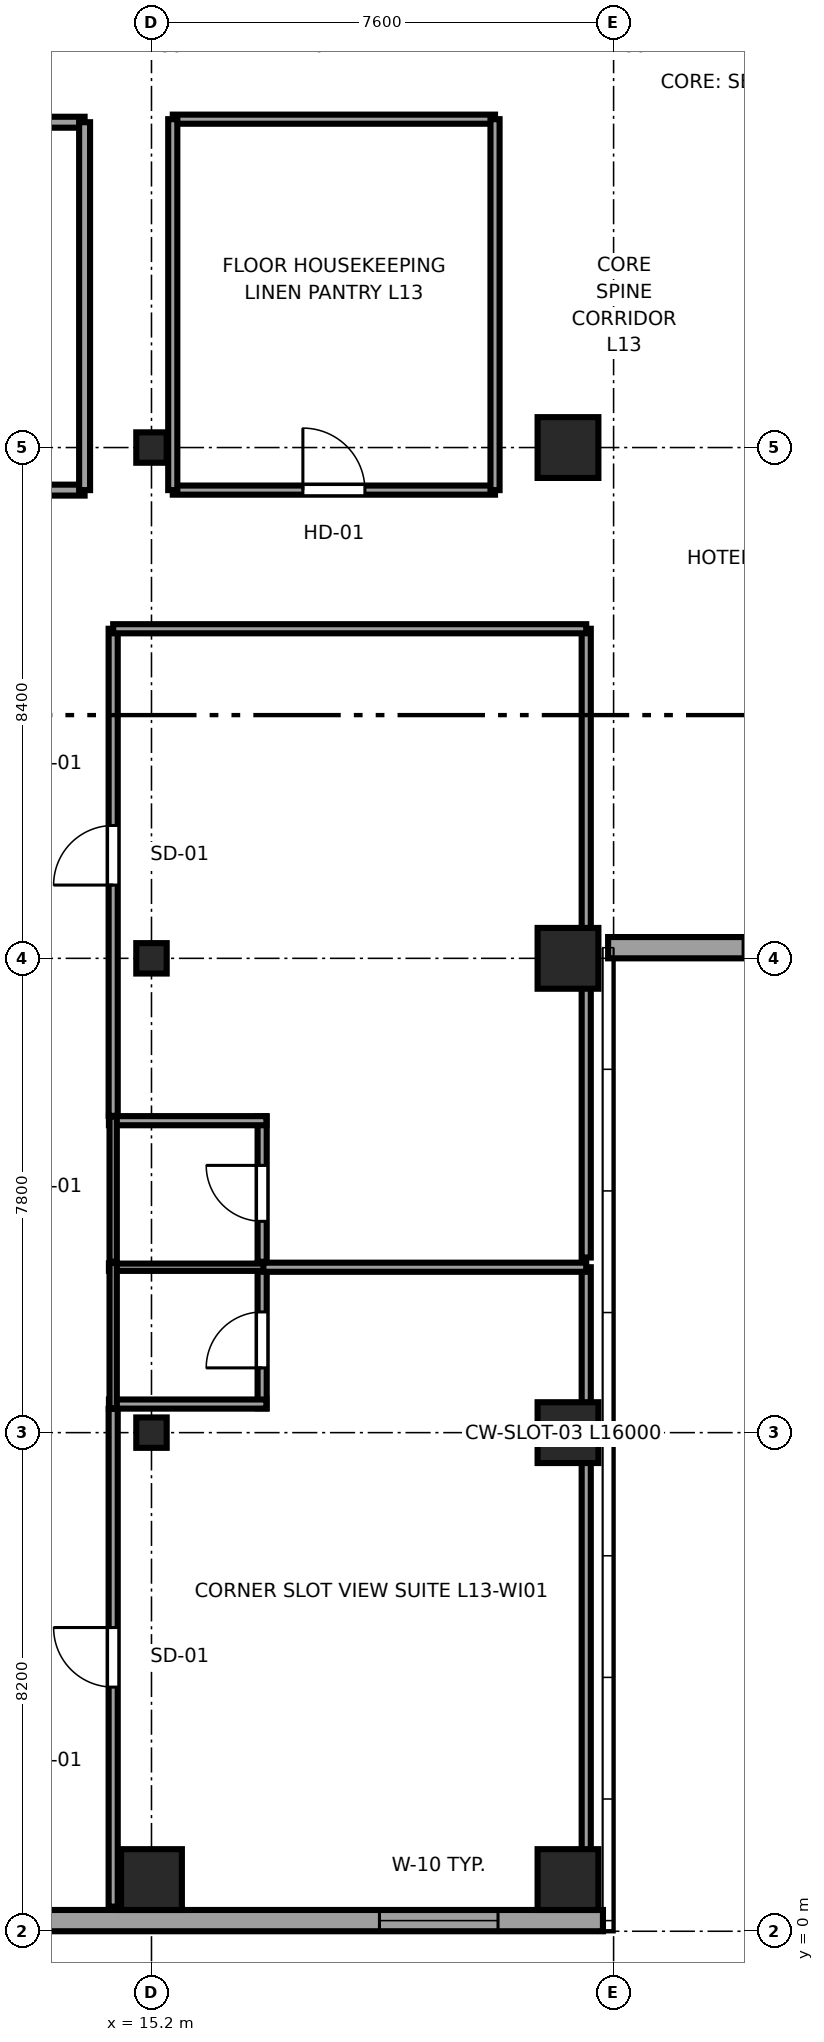
"""IFC4 building model, lengths in metres.
Left out: names, types, materials, properties, quantities, classifications, styles, units other than length and angle.
Written with IfcOpenShell. Run it as: python <this file> out.ifc"""

import sys

from ifc_helpers import new_model, si_unit, direction, frame, frame_2d, origin, origin_2d, place, context, subcontext, project, spatial, rectangle, i_section, extrude, source, transform, mapped, element, fill, save


model = new_model("IFC4")
c1 = context("Model", 3, precision=1e-05, world=origin(), true_north=direction((0.0, 1.0)))
c2 = subcontext(c1, "Body", "Model", "MODEL_VIEW")
j1 = project(units=[si_unit("LENGTHUNIT", "METRE"), si_unit("PLANEANGLEUNIT", "RADIAN")], contexts=[c1])
p1 = place(None, origin())
s1 = spatial("IfcSite", under=j1, at=p1, CompositionType="ELEMENT")
p2 = place(p1, origin())
s2 = spatial("IfcBuilding", under=s1, at=p2, CompositionType="ELEMENT")
p3 = place(p2, frame((0.0, 0.0, 56.85)))
s3 = spatial("IfcBuildingStorey", under=s2, at=p3, CompositionType="ELEMENT", Elevation=56.85)
m1 = source(origin(), c2, "Body", "SweptSolid", [
    extrude(rectangle(XDim=1.0, YDim=1.0, at=origin_2d()), origin(), (0.0, 0.0, 1.0), 3.55),
])
p4 = place(p3, frame((15.2, 0.85, 0.0), z_axis=(0.0, 0.0, 1.0), x_axis=(1.0, 0.0, 0.0)))
e1 = element("IfcColumn", 1, at=p4, inside=s3, PredefinedType="COLUMN", context=c2, shape_type="MappedRepresentation", body=[
    mapped(m1, transform((0.0, 0.0, 0.0), x_axis=(1.0, 0.0, 0.0), y_axis=(0.0, 1.0, 0.0), z_axis=(0.0, 0.0, 1.0), scale=1.0)),
])
m2 = source(origin(), c2, "Body", "SweptSolid", [
    extrude(i_section(OverallWidth=0.5, OverallDepth=0.5, WebThickness=0.028, FlangeThickness=0.045, at=origin_2d()), origin(), (0.0, 0.0, 1.0), 3.55),
])
for number, where, z_axis, x_axis in (
    (2, (15.2, 8.2, 0.0), (0.0, 0.0, 1.0), (1.0, 0.0, 0.0)),
    (3, (15.2, 16.0, 0.0), (0.0, 0.0, 1.0), (1.0, 0.0, 0.0)),
    (4, (15.2, 24.4, 0.0), (0.0, 0.0, 1.0), (1.0, 0.0, 0.0)),
):
    element("IfcColumn", number, at=place(p3, frame(where, z_axis=z_axis, x_axis=x_axis)), inside=s3, PredefinedType="COLUMN", context=c2, shape_type="MappedRepresentation", body=[
        mapped(m2, transform((0.0, 0.0, 0.0), x_axis=(1.0, 0.0, 0.0), y_axis=(0.0, 1.0, 0.0), z_axis=(0.0, 0.0, 1.0), scale=1.0)),
    ])
for number, where, z_axis, x_axis in (
    (5, (22.05, 0.85, 0.0), (0.0, 0.0, 1.0), (1.0, 0.0, 0.0)),
    (6, (22.05, 8.2, 0.0), (0.0, 0.0, 1.0), (1.0, 0.0, 0.0)),
    (7, (22.05, 16.0, 0.0), (0.0, 0.0, 1.0), (1.0, 0.0, 0.0)),
    (8, (22.05, 24.4, 0.0), (0.0, 0.0, 1.0), (1.0, 0.0, 0.0)),
):
    element("IfcColumn", number, at=place(p3, frame(where, z_axis=z_axis, x_axis=x_axis)), inside=s3, PredefinedType="COLUMN", context=c2, shape_type="MappedRepresentation", body=[
        mapped(m1, transform((0.0, 0.0, 0.0), x_axis=(1.0, 0.0, 0.0), y_axis=(0.0, 1.0, 0.0), z_axis=(0.0, 0.0, 1.0), scale=1.0)),
    ])
p5 = place(p3, frame((4.617, 0.175, 0.0), z_axis=(0.0, 0.0, 1.0), x_axis=(1.0, 0.0, 0.0)))
e9 = element("IfcWall", 9, at=p5, inside=s3, PredefinedType="SOLIDWALL", context=c2, shape_type="SweptSolid", body=[
    extrude(rectangle(XDim=18.008, YDim=0.35, at=frame_2d((9.004, 0.0))), origin(), (0.0, 0.0, 1.0), 3.37),
])
p6 = place(p5, frame((5.378, 0.0, 0.68)))
e10 = element("IfcOpeningElement", 10, at=p6, cuts=e9, PredefinedType="OPENING", context=c2, shape_type="SweptSolid", body=[
    extrude(rectangle(XDim=1.95, YDim=1.82, at=frame_2d((0.975, 0.91))), frame((0.0, 0.185, 0.0), z_axis=(0.0, -1.0, 0.0), x_axis=(1.0, 0.0, 0.0)), (0.0, 0.0, 1.0), 0.37),
])
p7 = place(p5, frame((14.332, 0.0, 0.68)))
e11 = element("IfcOpeningElement", 11, at=p7, cuts=e9, PredefinedType="OPENING", context=c2, shape_type="SweptSolid", body=[
    extrude(rectangle(XDim=1.95, YDim=1.82, at=frame_2d((0.975, 0.91))), frame((0.0, 0.185, 0.0), z_axis=(0.0, -1.0, 0.0), x_axis=(1.0, 0.0, 0.0)), (0.0, 0.0, 1.0), 0.37),
])
p8 = place(p3, frame((22.71, 16.175, 0.0), z_axis=(0.0, 0.0, 1.0), x_axis=(1.0, 0.0, 0.0)))
e12 = element("IfcWall", 12, at=p8, inside=s3, PredefinedType="SOLIDWALL", context=c2, shape_type="SweptSolid", body=[
    extrude(rectangle(XDim=11.58, YDim=0.35, at=frame_2d((5.79, 0.0))), origin(), (0.0, 0.0, 1.0), 2.748),
])
p9 = place(p8, frame((2.22, 0.0, 0.68)))
e13 = element("IfcOpeningElement", 13, at=p9, cuts=e12, PredefinedType="OPENING", context=c2, shape_type="SweptSolid", body=[
    extrude(rectangle(XDim=1.95, YDim=1.82, at=frame_2d((0.975, 0.91))), frame((0.0, 0.185, 0.0), z_axis=(0.0, -1.0, 0.0), x_axis=(1.0, 0.0, 0.0)), (0.0, 0.0, 1.0), 0.37),
])
p10 = place(p8, frame((7.41, 0.0, 0.68)))
e14 = element("IfcOpeningElement", 14, at=p10, cuts=e12, PredefinedType="OPENING", context=c2, shape_type="SweptSolid", body=[
    extrude(rectangle(XDim=1.95, YDim=1.82, at=frame_2d((0.975, 0.91))), frame((0.0, 0.185, 0.0), z_axis=(0.0, -1.0, 0.0), x_axis=(1.0, 0.0, 0.0)), (0.0, 0.0, 1.0), 0.37),
])
p11 = place(p3, frame((17.02, 8.6, 0.0), z_axis=(0.0, 0.0, 1.0), x_axis=(0.0, 1.0, 0.0)))
e15 = element("IfcWall", 15, at=p11, inside=s3, PredefinedType="PARTITIONING", context=c2, shape_type="SweptSolid", body=[
    extrude(rectangle(XDim=2.39, YDim=0.15, at=frame_2d((1.195, 0.0))), origin(), (0.0, 0.0, 1.0), 3.37),
])
p12 = place(p11, frame((0.665, 0.0, 0.0)))
e16 = element("IfcOpeningElement", 16, at=p12, cuts=e15, PredefinedType="OPENING", context=c2, shape_type="SweptSolid", body=[
    extrude(rectangle(XDim=0.92, YDim=2.01, at=frame_2d((0.46, 1.005))), frame((0.0, 0.085, 0.0), z_axis=(0.0, -1.0, 0.0), x_axis=(1.0, 0.0, 0.0)), (0.0, 0.0, 1.0), 0.17),
])
p13 = place(p3, frame((14.5, 8.67, 0.0), z_axis=(0.0, 0.0, 1.0), x_axis=(1.0, 0.0, 0.0)))
e17 = element("IfcWall", 17, at=p13, inside=s3, PredefinedType="PARTITIONING", context=c2, shape_type="SweptSolid", body=[
    extrude(rectangle(XDim=2.59, YDim=0.15, at=frame_2d((1.295, 0.0))), origin(), (0.0, 0.0, 1.0), 3.37),
])
p14 = place(p3, frame((14.5, 10.92, 0.0), z_axis=(0.0, 0.0, 1.0), x_axis=(1.0, 0.0, 0.0)))
e18 = element("IfcWall", 18, at=p14, inside=s3, PredefinedType="PLUMBINGWALL", context=c2, shape_type="SweptSolid", body=[
    extrude(rectangle(XDim=2.59, YDim=0.12, at=frame_2d((1.295, 0.0))), origin(), (0.0, 0.0, 1.0), 3.37),
])
p15 = place(p3, frame((14.57, 8.6, 0.0), z_axis=(0.0, 0.0, 1.0), x_axis=(0.0, 1.0, 0.0)))
e19 = element("IfcWall", 19, at=p15, inside=s3, PredefinedType="PLUMBINGWALL", context=c2, shape_type="SweptSolid", body=[
    extrude(rectangle(XDim=2.39, YDim=0.12, at=frame_2d((1.195, 0.0))), origin(), (0.0, 0.0, 1.0), 3.37),
])
p16 = place(p3, frame((17.02, 11.01, 0.0), z_axis=(0.0, 0.0, 1.0), x_axis=(0.0, 1.0, 0.0)))
e20 = element("IfcWall", 20, at=p16, inside=s3, PredefinedType="PARTITIONING", context=c2, shape_type="SweptSolid", body=[
    extrude(rectangle(XDim=2.39, YDim=0.15, at=frame_2d((1.195, 0.0))), origin(), (0.0, 0.0, 1.0), 3.37),
])
p17 = place(p16, frame((0.665, 0.0, 0.0)))
e21 = element("IfcOpeningElement", 21, at=p17, cuts=e20, PredefinedType="OPENING", context=c2, shape_type="SweptSolid", body=[
    extrude(rectangle(XDim=0.92, YDim=2.01, at=frame_2d((0.46, 1.005))), frame((0.0, 0.085, 0.0), z_axis=(0.0, -1.0, 0.0), x_axis=(1.0, 0.0, 0.0)), (0.0, 0.0, 1.0), 0.17),
])
p18 = place(p3, frame((14.5, 13.33, 0.0), z_axis=(0.0, 0.0, 1.0), x_axis=(1.0, 0.0, 0.0)))
e22 = element("IfcWall", 22, at=p18, inside=s3, PredefinedType="PARTITIONING", context=c2, shape_type="SweptSolid", body=[
    extrude(rectangle(XDim=2.59, YDim=0.15, at=frame_2d((1.295, 0.0))), origin(), (0.0, 0.0, 1.0), 3.37),
])
p19 = place(p3, frame((14.57, 11.01, 0.0), z_axis=(0.0, 0.0, 1.0), x_axis=(0.0, 1.0, 0.0)))
e23 = element("IfcWall", 23, at=p19, inside=s3, PredefinedType="PLUMBINGWALL", context=c2, shape_type="SweptSolid", body=[
    extrude(rectangle(XDim=2.39, YDim=0.12, at=frame_2d((1.195, 0.0))), origin(), (0.0, 0.0, 1.0), 3.37),
])
p20 = place(p3, frame((14.57, 0.405, 0.0), z_axis=(0.0, 0.0, 1.0), x_axis=(0.0, 1.0, 0.0)))
e24 = element("IfcWall", 24, at=p20, inside=s3, PredefinedType="PARTITIONING", context=c2, shape_type="SweptSolid", body=[
    extrude(rectangle(XDim=8.185, YDim=0.15, at=frame_2d((4.093, 0.0))), origin(), (0.0, 0.0, 1.0), 3.37),
])
p21 = place(p20, frame((3.61, 0.0, 0.0)))
e25 = element("IfcOpeningElement", 25, at=p21, cuts=e24, PredefinedType="OPENING", context=c2, shape_type="SweptSolid", body=[
    extrude(rectangle(XDim=0.98, YDim=2.12, at=frame_2d((0.49, 1.06))), frame((0.0, 0.085, 0.0), z_axis=(0.0, -1.0, 0.0), x_axis=(1.0, 0.0, 0.0)), (0.0, 0.0, 1.0), 0.17),
])
p22 = place(p3, frame((22.35, 0.405, 0.0), z_axis=(0.0, 0.0, 1.0), x_axis=(0.0, 1.0, 0.0)))
e26 = element("IfcWall", 26, at=p22, inside=s3, PredefinedType="PARTITIONING", context=c2, shape_type="SweptSolid", body=[
    extrude(rectangle(XDim=10.515, YDim=0.15, at=frame_2d((5.257, 0.0))), origin(), (0.0, 0.0, 1.0), 3.37),
])
p23 = place(p3, frame((17.04, 10.92, 0.0), z_axis=(0.0, 0.0, 1.0), x_axis=(1.0, 0.0, 0.0)))
e27 = element("IfcWall", 27, at=p23, inside=s3, PredefinedType="PARTITIONING", context=c2, shape_type="SweptSolid", body=[
    extrude(rectangle(XDim=5.31, YDim=0.15, at=frame_2d((2.655, 0.0))), origin(), (0.0, 0.0, 1.0), 3.37),
])
p24 = place(p3, frame((14.57, 13.41, 0.0), z_axis=(0.0, 0.0, 1.0), x_axis=(0.0, 1.0, 0.0)))
e28 = element("IfcWall", 28, at=p24, inside=s3, PredefinedType="PARTITIONING", context=c2, shape_type="SweptSolid", body=[
    extrude(rectangle(XDim=8.01, YDim=0.15, at=frame_2d((4.005, 0.0))), origin(), (0.0, 0.0, 1.0), 3.37),
])
p25 = place(p24, frame((3.795, 0.0, 0.0)))
e29 = element("IfcOpeningElement", 29, at=p25, cuts=e28, PredefinedType="OPENING", context=c2, shape_type="SweptSolid", body=[
    extrude(rectangle(XDim=0.98, YDim=2.12, at=frame_2d((0.49, 1.06))), frame((0.0, 0.085, 0.0), z_axis=(0.0, -1.0, 0.0), x_axis=(1.0, 0.0, 0.0)), (0.0, 0.0, 1.0), 0.17),
])
p26 = place(p3, frame((22.35, 11.08, 0.0), z_axis=(0.0, 0.0, 1.0), x_axis=(0.0, 1.0, 0.0)))
e30 = element("IfcWall", 30, at=p26, inside=s3, PredefinedType="PARTITIONING", context=c2, shape_type="SweptSolid", body=[
    extrude(rectangle(XDim=10.34, YDim=0.15, at=frame_2d((5.17, 0.0))), origin(), (0.0, 0.0, 1.0), 3.37),
])
p27 = place(p3, frame((14.57, 21.42, 0.0), z_axis=(0.0, 0.0, 1.0), x_axis=(1.0, 0.0, 0.0)))
e31 = element("IfcWall", 31, at=p27, inside=s3, PredefinedType="PARTITIONING", context=c2, shape_type="SweptSolid", body=[
    extrude(rectangle(XDim=7.78, YDim=0.15, at=frame_2d((3.89, 0.0))), origin(), (0.0, 0.0, 1.0), 3.37),
])
p28 = place(p3, frame((9.88, 23.7, 0.0), z_axis=(0.0, 0.0, 1.0), x_axis=(1.0, 0.0, 0.0)))
e32 = element("IfcWall", 32, at=p28, inside=s3, PredefinedType="PARTITIONING", context=c2, shape_type="SweptSolid", body=[
    extrude(rectangle(XDim=4.22, YDim=0.18, at=frame_2d((2.11, 0.0))), origin(), (0.0, 0.0, 1.0), 3.37),
])
p29 = place(p28, frame((1.285, 0.0, 0.0)))
e33 = element("IfcOpeningElement", 33, at=p29, cuts=e32, PredefinedType="OPENING", context=c2, shape_type="SweptSolid", body=[
    extrude(rectangle(XDim=1.65, YDim=2.15, at=frame_2d((0.825, 1.075))), frame((0.0, 0.1, 0.0), z_axis=(0.0, -1.0, 0.0), x_axis=(1.0, 0.0, 0.0)), (0.0, 0.0, 1.0), 0.2),
])
p30 = place(p3, frame((9.88, 29.75, 0.0), z_axis=(0.0, 0.0, 1.0), x_axis=(1.0, 0.0, 0.0)))
e34 = element("IfcWall", 34, at=p30, inside=s3, PredefinedType="PARTITIONING", context=c2, shape_type="SweptSolid", body=[
    extrude(rectangle(XDim=4.22, YDim=0.18, at=frame_2d((2.11, 0.0))), origin(), (0.0, 0.0, 1.0), 3.37),
])
p31 = place(p3, frame((14.1, 23.7, 0.0), z_axis=(0.0, 0.0, 1.0), x_axis=(0.0, 1.0, 0.0)))
e35 = element("IfcWall", 35, at=p31, inside=s3, PredefinedType="PARTITIONING", context=c2, shape_type="SweptSolid", body=[
    extrude(rectangle(XDim=6.05, YDim=0.18, at=frame_2d((3.025, 0.0))), origin(), (0.0, 0.0, 1.0), 3.37),
])
p32 = place(p3, frame((15.55, 23.7, 0.0), z_axis=(0.0, 0.0, 1.0), x_axis=(1.0, 0.0, 0.0)))
e36 = element("IfcWall", 36, at=p32, inside=s3, PredefinedType="PARTITIONING", context=c2, shape_type="SweptSolid", body=[
    extrude(rectangle(XDim=5.3, YDim=0.15, at=frame_2d((2.65, 0.0))), origin(), (0.0, 0.0, 1.0), 3.37),
])
p33 = place(p32, frame((2.14, 0.0, 0.0)))
e37 = element("IfcOpeningElement", 37, at=p33, cuts=e36, PredefinedType="OPENING", context=c2, shape_type="SweptSolid", body=[
    extrude(rectangle(XDim=1.02, YDim=2.03, at=frame_2d((0.51, 1.015))), frame((0.0, 0.085, 0.0), z_axis=(0.0, -1.0, 0.0), x_axis=(1.0, 0.0, 0.0)), (0.0, 0.0, 1.0), 0.17),
])
p34 = place(p3, frame((15.55, 29.8, 0.0), z_axis=(0.0, 0.0, 1.0), x_axis=(1.0, 0.0, 0.0)))
e38 = element("IfcWall", 38, at=p34, inside=s3, PredefinedType="PARTITIONING", context=c2, shape_type="SweptSolid", body=[
    extrude(rectangle(XDim=5.3, YDim=0.15, at=frame_2d((2.65, 0.0))), origin(), (0.0, 0.0, 1.0), 3.37),
])
for number, where, z_axis, x_axis in (
    (39, (15.55, 23.7, 0.0), (0.0, 0.0, 1.0), (0.0, 1.0, 0.0)),
    (40, (20.85, 23.7, 0.0), (0.0, 0.0, 1.0), (0.0, 1.0, 0.0)),
):
    element("IfcWall", number, at=place(p3, frame(where, z_axis=z_axis, x_axis=x_axis)), inside=s3, PredefinedType="PARTITIONING", context=c2, shape_type="SweptSolid", body=[
        extrude(rectangle(XDim=6.1, YDim=0.15, at=frame_2d((3.05, 0.0))), origin(), (0.0, 0.0, 1.0), 3.37),
    ])
m3 = source(origin(), c2, "Body", "SweptSolid", [
    extrude(rectangle(XDim=1.95, YDim=1.82, at=frame_2d((0.975, 0.91))), frame((0.0, 0.09, 0.0), z_axis=(0.0, -1.0, 0.0), x_axis=(1.0, 0.0, 0.0)), (0.0, 0.0, 1.0), 0.06),
])
p35 = place(p7, origin())
e41 = element("IfcWindow", 41, at=p35, inside=s3, PartitioningType="DOUBLE_PANEL_VERTICAL", PredefinedType="WINDOW", context=c2, shape_type="MappedRepresentation", body=[
    mapped(m3, transform((0.0, 0.0, 0.0), x_axis=(1.0, 0.0, 0.0), y_axis=(0.0, 1.0, 0.0), z_axis=(0.0, 0.0, 1.0), scale=1.0)),
])
fill(e11, e41)
p36 = place(p9, origin())
e42 = element("IfcWindow", 42, at=p36, inside=s3, PartitioningType="DOUBLE_PANEL_VERTICAL", PredefinedType="WINDOW", context=c2, shape_type="MappedRepresentation", body=[
    mapped(m3, transform((0.0, 0.0, 0.0), x_axis=(1.0, 0.0, 0.0), y_axis=(0.0, 1.0, 0.0), z_axis=(0.0, 0.0, 1.0), scale=1.0)),
])
fill(e13, e42)
m4 = source(origin(), c2, "Body", "SweptSolid", [
    extrude(rectangle(XDim=0.92, YDim=2.01, at=frame_2d((0.46, 1.005))), frame((0.0, 0.025, 0.0), z_axis=(0.0, -1.0, 0.0), x_axis=(1.0, 0.0, 0.0)), (0.0, 0.0, 1.0), 0.05),
])
p37 = place(p12, origin())
e43 = element("IfcDoor", 43, at=p37, inside=s3, OperationType="SINGLE_SWING_LEFT", PredefinedType="DOOR", context=c2, shape_type="MappedRepresentation", body=[
    mapped(m4, transform((0.0, 0.0, 0.0), x_axis=(1.0, 0.0, 0.0), y_axis=(0.0, 1.0, 0.0), z_axis=(0.0, 0.0, 1.0), scale=1.0)),
])
fill(e16, e43)
p38 = place(p17, origin())
e44 = element("IfcDoor", 44, at=p38, inside=s3, OperationType="SINGLE_SWING_RIGHT", PredefinedType="DOOR", context=c2, shape_type="MappedRepresentation", body=[
    mapped(m4, transform((0.0, 0.0, 0.0), x_axis=(1.0, 0.0, 0.0), y_axis=(0.0, 1.0, 0.0), z_axis=(0.0, 0.0, 1.0), scale=1.0)),
])
fill(e21, e44)
m5 = source(origin(), c2, "Body", "SweptSolid", [
    extrude(rectangle(XDim=0.98, YDim=2.12, at=frame_2d((0.49, 1.06))), frame((0.0, 0.025, 0.0), z_axis=(0.0, -1.0, 0.0), x_axis=(1.0, 0.0, 0.0)), (0.0, 0.0, 1.0), 0.05),
])
p39 = place(p21, origin())
e45 = element("IfcDoor", 45, at=p39, inside=s3, OperationType="SINGLE_SWING_RIGHT", PredefinedType="DOOR", context=c2, shape_type="MappedRepresentation", body=[
    mapped(m5, transform((0.0, 0.0, 0.0), x_axis=(1.0, 0.0, 0.0), y_axis=(0.0, 1.0, 0.0), z_axis=(0.0, 0.0, 1.0), scale=1.0)),
])
fill(e25, e45)
p40 = place(p25, origin())
e46 = element("IfcDoor", 46, at=p40, inside=s3, OperationType="SINGLE_SWING_LEFT", PredefinedType="DOOR", context=c2, shape_type="MappedRepresentation", body=[
    mapped(m5, transform((0.0, 0.0, 0.0), x_axis=(1.0, 0.0, 0.0), y_axis=(0.0, 1.0, 0.0), z_axis=(0.0, 0.0, 1.0), scale=1.0)),
])
fill(e29, e46)
m6 = source(origin(), c2, "Body", "SweptSolid", [
    extrude(rectangle(XDim=1.02, YDim=2.03, at=frame_2d((0.51, 1.015))), frame((0.0, 0.025, 0.0), z_axis=(0.0, -1.0, 0.0), x_axis=(1.0, 0.0, 0.0)), (0.0, 0.0, 1.0), 0.05),
])
p41 = place(p33, origin())
e47 = element("IfcDoor", 47, at=p41, inside=s3, OperationType="SINGLE_SWING_LEFT", PredefinedType="DOOR", context=c2, shape_type="MappedRepresentation", body=[
    mapped(m6, transform((0.0, 0.0, 0.0), x_axis=(1.0, 0.0, 0.0), y_axis=(0.0, 1.0, 0.0), z_axis=(0.0, 0.0, 1.0), scale=1.0)),
])
fill(e37, e47)
save(model, sys.argv[1])
